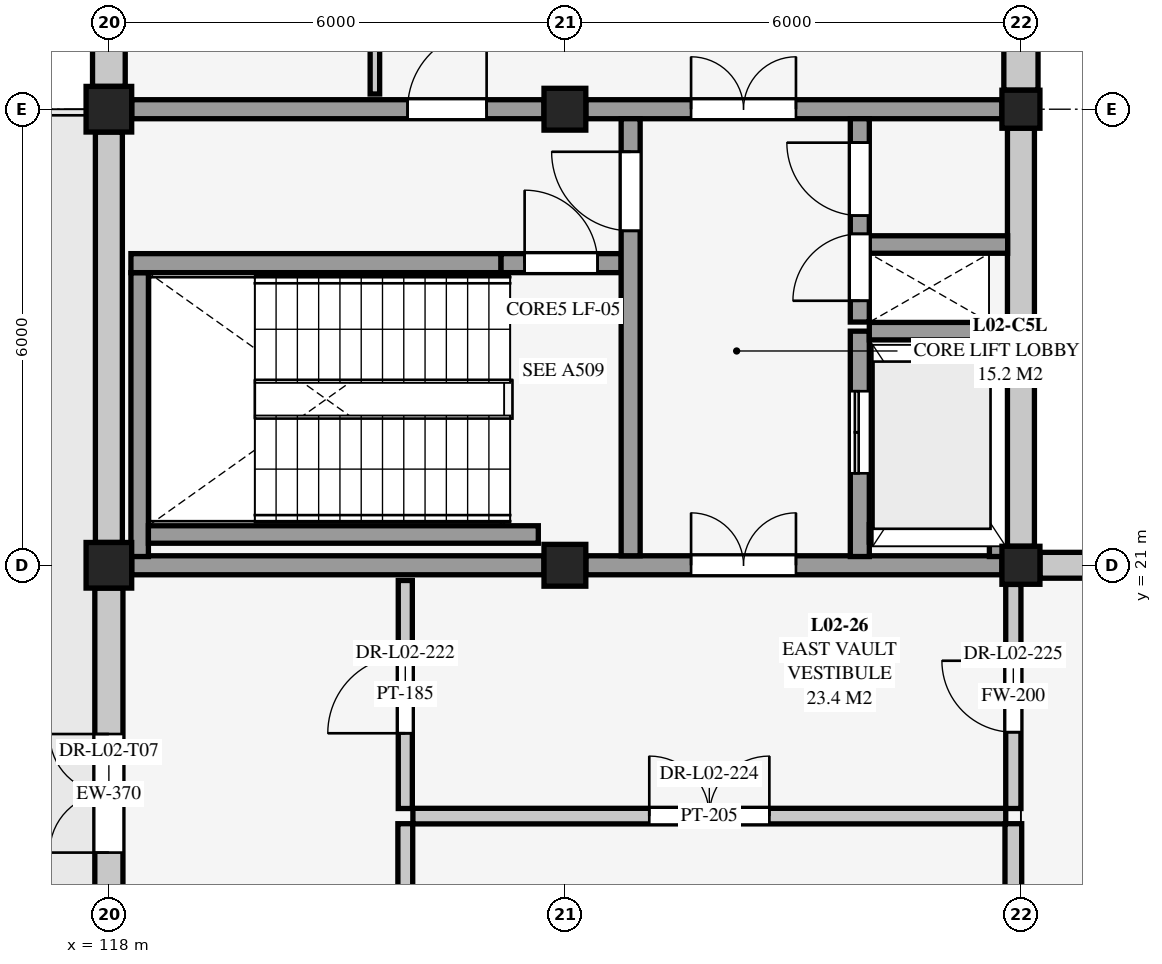
"""IFC4 building model, lengths in metres.
Left out: names, types, materials, properties, quantities, classifications, styles, units other than length and angle.
Written with IfcOpenShell. Run it as: python <this file> out.ifc"""

import sys

from ifc_helpers import new_model, si_unit, direction, frame, frame_2d, origin, origin_2d, place, context, subcontext, project, spatial, rectangle, extrude, element, fill, save


model = new_model("IFC4")
c1 = context("Model", 3, precision=1e-05, world=origin(), true_north=direction((0.0, 1.0)))
c2 = subcontext(c1, "Body", "Model", "MODEL_VIEW")
j1 = project(units=[si_unit("LENGTHUNIT", "METRE"), si_unit("PLANEANGLEUNIT", "RADIAN")], contexts=[c1])
p1 = place(None, origin())
s1 = spatial("IfcSite", under=j1, at=p1, CompositionType="ELEMENT")
p2 = place(p1, origin())
s2 = spatial("IfcBuilding", under=s1, at=p2, CompositionType="ELEMENT")
p3 = place(p2, frame((0.0, 0.0, 4.5)))
s3 = spatial("IfcBuildingStorey", under=s2, at=p3, CompositionType="ELEMENT", Elevation=4.5)
for number, where, z_axis, x_axis in (
    (1, (118.0, 21.0, 0.0), (0.0, 0.0, 1.0), (1.0, 0.0, 0.0)),
    (2, (118.0, 27.0, 0.0), (0.0, 0.0, 1.0), (1.0, 0.0, 0.0)),
):
    element("IfcColumn", number, at=place(p3, frame(where, z_axis=z_axis, x_axis=x_axis)), inside=s3, PredefinedType="COLUMN", context=c2, shape_type="SweptSolid", body=[
        extrude(rectangle(XDim=0.6, YDim=0.6, at=origin_2d()), origin(), (0.0, 0.0, 1.0), 4.5),
    ])
for number, where, z_axis, x_axis in (
    (3, (124.0, 21.0, 0.0), (0.0, 0.0, 1.0), (1.0, 0.0, 0.0)),
    (4, (124.0, 27.0, 0.0), (0.0, 0.0, 1.0), (1.0, 0.0, 0.0)),
):
    element("IfcColumn", number, at=place(p3, frame(where, z_axis=z_axis, x_axis=x_axis)), inside=s3, PredefinedType="COLUMN", context=c2, shape_type="SweptSolid", body=[
        extrude(rectangle(XDim=0.55, YDim=0.55, at=origin_2d()), origin(), (0.0, 0.0, 1.0), 4.5),
    ])
for number, where, z_axis, x_axis in (
    (5, (130.0, 21.0, 0.0), (0.0, 0.0, 1.0), (1.0, 0.0, 0.0)),
    (6, (130.0, 27.0, 0.0), (0.0, 0.0, 1.0), (1.0, 0.0, 0.0)),
):
    element("IfcColumn", number, at=place(p3, frame(where, z_axis=z_axis, x_axis=x_axis)), inside=s3, PredefinedType="COLUMN", context=c2, shape_type="SweptSolid", body=[
        extrude(rectangle(XDim=0.5, YDim=0.5, at=origin_2d()), origin(), (0.0, 0.0, 1.0), 4.5),
    ])
p4 = place(p3, frame((130.25, 21.0, 0.0), z_axis=(0.0, 0.0, 1.0), x_axis=(1.0, 0.0, 0.0)))
e7 = element("IfcWall", 7, at=p4, inside=s3, PredefinedType="SOLIDWALL", context=c2, shape_type="SweptSolid", body=[
    extrude(rectangle(XDim=5.425, YDim=0.34, at=frame_2d((2.712, 0.0))), origin(), (0.0, 0.0, 1.0), 3.797),
])
p5 = place(p4, frame((2.137, 0.0, 0.85)))
e8 = element("IfcOpeningElement", 8, at=p5, cuts=e7, PredefinedType="OPENING", context=c2, shape_type="SweptSolid", body=[
    extrude(rectangle(XDim=1.15, YDim=2.05, at=frame_2d((0.575, 1.025))), frame((0.0, 0.18, 0.0), z_axis=(0.0, -1.0, 0.0), x_axis=(1.0, 0.0, 0.0)), (0.0, 0.0, 1.0), 0.36),
])
p6 = place(p3, frame((118.0, 15.275, 0.0), z_axis=(0.0, 0.0, 1.0), x_axis=(0.0, 1.0, 0.0)))
e9 = element("IfcWall", 9, at=p6, inside=s3, PredefinedType="SOLIDWALL", context=c2, shape_type="SweptSolid", body=[
    extrude(rectangle(XDim=5.425, YDim=0.37, at=frame_2d((2.712, 0.0))), origin(), (0.0, 0.0, 1.0), 3.797),
])
p7 = place(p6, frame((1.945, 0.0, 0.0)))
e10 = element("IfcOpeningElement", 10, at=p7, cuts=e9, PredefinedType="OPENING", context=c2, shape_type="SweptSolid", body=[
    extrude(rectangle(XDim=1.56, YDim=2.18, at=frame_2d((0.78, 1.09))), frame((0.0, 0.195, 0.0), z_axis=(0.0, -1.0, 0.0), x_axis=(1.0, 0.0, 0.0)), (0.0, 0.0, 1.0), 0.39),
])
p8 = place(p3, frame((118.0, 21.3, 0.0), z_axis=(0.0, 0.0, 1.0), x_axis=(0.0, 1.0, 0.0)))
e11 = element("IfcWall", 11, at=p8, inside=s3, PredefinedType="SOLIDWALL", context=c2, shape_type="SweptSolid", body=[
    extrude(rectangle(XDim=5.4, YDim=0.355, at=frame_2d((2.7, 0.0))), origin(), (0.0, 0.0, 1.0), 3.797),
])
p9 = place(p3, frame((130.0, 26.75, 0.0), z_axis=(0.0, 0.0, 1.0), x_axis=(0.0, -1.0, 0.0)))
e12 = element("IfcWall", 12, at=p9, inside=s3, PredefinedType="SOLIDWALL", context=c2, shape_type="SweptSolid", body=[
    extrude(rectangle(XDim=5.5, YDim=0.355, at=frame_2d((2.75, 0.0))), origin(), (0.0, 0.0, 1.0), 3.797),
])
p10 = place(p3, frame((118.0, 27.3, 0.0), z_axis=(0.0, 0.0, 1.0), x_axis=(0.0, 1.0, 0.0)))
e13 = element("IfcWall", 13, at=p10, inside=s3, PredefinedType="SOLIDWALL", context=c2, shape_type="SweptSolid", body=[
    extrude(rectangle(XDim=5.4, YDim=0.43, at=frame_2d((2.7, 0.0))), origin(), (0.0, 0.0, 1.0), 3.778),
])
p11 = place(p10, frame((1.975, 0.0, 0.75)))
e14 = element("IfcOpeningElement", 14, at=p11, cuts=e13, PredefinedType="OPENING", context=c2, shape_type="SweptSolid", body=[
    extrude(rectangle(XDim=1.45, YDim=2.25, at=frame_2d((0.725, 1.125))), frame((0.0, 0.225, 0.0), z_axis=(0.0, -1.0, 0.0), x_axis=(1.0, 0.0, 0.0)), (0.0, 0.0, 1.0), 0.45),
])
p12 = place(p3, frame((130.0, 32.75, 0.0), z_axis=(0.0, 0.0, 1.0), x_axis=(0.0, -1.0, 0.0)))
e15 = element("IfcWall", 15, at=p12, inside=s3, PredefinedType="SOLIDWALL", context=c2, shape_type="SweptSolid", body=[
    extrude(rectangle(XDim=5.5, YDim=0.45, at=frame_2d((2.75, 0.0))), origin(), (0.0, 0.0, 1.0), 3.778),
])
p13 = place(p12, frame((1.975, 0.0, 0.75)))
e16 = element("IfcOpeningElement", 16, at=p13, cuts=e15, PredefinedType="OPENING", context=c2, shape_type="SweptSolid", body=[
    extrude(rectangle(XDim=1.55, YDim=2.25, at=frame_2d((0.775, 1.125))), frame((0.0, 0.235, 0.0), z_axis=(0.0, -1.0, 0.0), x_axis=(1.0, 0.0, 0.0)), (0.0, 0.0, 1.0), 0.47),
])
p14 = place(p3, frame((118.3, 21.0, 0.0), z_axis=(0.0, 0.0, 1.0), x_axis=(1.0, 0.0, 0.0)))
e17 = element("IfcWall", 17, at=p14, inside=s3, PredefinedType="SHEAR", context=c2, shape_type="SweptSolid", body=[
    extrude(rectangle(XDim=5.425, YDim=0.25, at=frame_2d((2.712, 0.0))), origin(), (0.0, 0.0, 1.0), 4.204),
])
p15 = place(p3, frame((124.275, 21.0, 0.0), z_axis=(0.0, 0.0, 1.0), x_axis=(1.0, 0.0, 0.0)))
e18 = element("IfcWall", 18, at=p15, inside=s3, PredefinedType="SHEAR", context=c2, shape_type="SweptSolid", body=[
    extrude(rectangle(XDim=5.475, YDim=0.25, at=frame_2d((2.738, 0.0))), origin(), (0.0, 0.0, 1.0), 4.204),
])
p16 = place(p15, frame((1.385, 0.0, 0.0)))
e19 = element("IfcOpeningElement", 19, at=p16, cuts=e18, PredefinedType="OPENING", context=c2, shape_type="SweptSolid", body=[
    extrude(rectangle(XDim=1.38, YDim=2.16, at=frame_2d((0.69, 1.08))), frame((0.0, 0.135, 0.0), z_axis=(0.0, -1.0, 0.0), x_axis=(1.0, 0.0, 0.0)), (0.0, 0.0, 1.0), 0.27),
])
p17 = place(p3, frame((118.3, 27.0, 0.0), z_axis=(0.0, 0.0, 1.0), x_axis=(1.0, 0.0, 0.0)))
e20 = element("IfcWall", 20, at=p17, inside=s3, PredefinedType="SHEAR", context=c2, shape_type="SweptSolid", body=[
    extrude(rectangle(XDim=5.425, YDim=0.25, at=frame_2d((2.712, 0.0))), origin(), (0.0, 0.0, 1.0), 4.204),
])
p18 = place(p17, frame((3.63, 0.0, 0.0)))
e21 = element("IfcOpeningElement", 21, at=p18, cuts=e20, PredefinedType="OPENING", context=c2, shape_type="SweptSolid", body=[
    extrude(rectangle(XDim=1.04, YDim=2.14, at=frame_2d((0.52, 1.07))), frame((0.0, 0.135, 0.0), z_axis=(0.0, -1.0, 0.0), x_axis=(1.0, 0.0, 0.0)), (0.0, 0.0, 1.0), 0.27),
])
p19 = place(p3, frame((124.275, 27.0, 0.0), z_axis=(0.0, 0.0, 1.0), x_axis=(1.0, 0.0, 0.0)))
e22 = element("IfcWall", 22, at=p19, inside=s3, PredefinedType="SHEAR", context=c2, shape_type="SweptSolid", body=[
    extrude(rectangle(XDim=5.475, YDim=0.25, at=frame_2d((2.738, 0.0))), origin(), (0.0, 0.0, 1.0), 4.204),
])
p20 = place(p19, frame((1.385, 0.0, 0.0)))
e23 = element("IfcOpeningElement", 23, at=p20, cuts=e22, PredefinedType="OPENING", context=c2, shape_type="SweptSolid", body=[
    extrude(rectangle(XDim=1.38, YDim=2.16, at=frame_2d((0.69, 1.08))), frame((0.0, 0.135, 0.0), z_axis=(0.0, -1.0, 0.0), x_axis=(1.0, 0.0, 0.0)), (0.0, 0.0, 1.0), 0.27),
])
p21 = place(p3, frame((118.405, 21.115, 0.0), z_axis=(0.0, 0.0, 1.0), x_axis=(0.0, 1.0, 0.0)))
e24 = element("IfcWall", 24, at=p21, inside=s3, PredefinedType="SHEAR", context=c2, shape_type="SweptSolid", body=[
    extrude(rectangle(XDim=3.735, YDim=0.23, at=frame_2d((1.868, 0.0))), origin(), (0.0, 0.0, 1.0), 4.5),
])
p22 = place(p3, frame((118.52, 21.405, 0.0), z_axis=(0.0, 0.0, 1.0), x_axis=(1.0, 0.0, 0.0)))
e25 = element("IfcWall", 25, at=p22, inside=s3, PredefinedType="SHEAR", context=c2, shape_type="SweptSolid", body=[
    extrude(rectangle(XDim=5.13, YDim=0.23, at=frame_2d((2.565, 0.0))), origin(), (0.0, 0.0, 1.0), 4.5),
])
p23 = place(p3, frame((118.29, 24.975, 0.0), z_axis=(0.0, 0.0, 1.0), x_axis=(1.0, 0.0, 0.0)))
e26 = element("IfcWall", 26, at=p23, inside=s3, PredefinedType="SHEAR", context=c2, shape_type="SweptSolid", body=[
    extrude(rectangle(XDim=4.87, YDim=0.25, at=frame_2d((2.435, 0.0))), origin(), (0.0, 0.0, 1.0), 4.5),
])
p24 = place(p3, frame((123.16, 24.975, 0.0), z_axis=(0.0, 0.0, 1.0), x_axis=(1.0, 0.0, 0.0)))
e27 = element("IfcWall", 27, at=p24, inside=s3, PredefinedType="SHEAR", context=c2, shape_type="SweptSolid", body=[
    extrude(rectangle(XDim=1.58, YDim=0.25, at=frame_2d((0.79, 0.0))), origin(), (0.0, 0.0, 1.0), 4.204),
])
p25 = place(p24, frame((0.31, 0.0, 0.0)))
e28 = element("IfcOpeningElement", 28, at=p25, cuts=e27, PredefinedType="OPENING", context=c2, shape_type="SweptSolid", body=[
    extrude(rectangle(XDim=0.96, YDim=2.12, at=frame_2d((0.48, 1.06))), frame((0.0, 0.135, 0.0), z_axis=(0.0, -1.0, 0.0), x_axis=(1.0, 0.0, 0.0)), (0.0, 0.0, 1.0), 0.27),
])
p26 = place(p3, frame((124.865, 21.125, 0.0), z_axis=(0.0, 0.0, 1.0), x_axis=(0.0, 1.0, 0.0)))
e29 = element("IfcWall", 29, at=p26, inside=s3, PredefinedType="SHEAR", context=c2, shape_type="SweptSolid", body=[
    extrude(rectangle(XDim=5.75, YDim=0.25, at=frame_2d((2.875, 0.0))), origin(), (0.0, 0.0, 1.0), 4.204),
])
p27 = place(p26, frame((4.275, 0.0, 0.0)))
e30 = element("IfcOpeningElement", 30, at=p27, cuts=e29, PredefinedType="OPENING", context=c2, shape_type="SweptSolid", body=[
    extrude(rectangle(XDim=1.04, YDim=2.14, at=frame_2d((0.52, 1.07))), frame((0.0, 0.135, 0.0), z_axis=(0.0, -1.0, 0.0), x_axis=(1.0, 0.0, 0.0)), (0.0, 0.0, 1.0), 0.27),
])
p28 = place(p3, frame((127.88, 21.115, 0.0), z_axis=(0.0, 0.0, 1.0), x_axis=(0.0, 1.0, 0.0)))
e31 = element("IfcWall", 31, at=p28, inside=s3, PredefinedType="SHEAR", context=c2, shape_type="SweptSolid", body=[
    extrude(rectangle(XDim=2.965, YDim=0.25, at=frame_2d((1.482, 0.0))), origin(), (0.0, 0.0, 1.0), 4.5),
])
p29 = place(p28, frame((1.095, 0.0, 0.0)))
e32 = element("IfcOpeningElement", 32, at=p29, cuts=e31, PredefinedType="OPENING", context=c2, shape_type="SweptSolid", body=[
    extrude(rectangle(XDim=1.08, YDim=2.15, at=frame_2d((0.54, 1.075))), frame((0.0, 0.135, 0.0), z_axis=(0.0, -1.0, 0.0), x_axis=(1.0, 0.0, 0.0)), (0.0, 0.0, 1.0), 0.27),
])
p30 = place(p3, frame((128.005, 21.42, 0.0), z_axis=(0.0, 0.0, 1.0), x_axis=(1.0, 0.0, 0.0)))
e33 = element("IfcWall", 33, at=p30, inside=s3, PredefinedType="SHEAR", context=c2, shape_type="SweptSolid", body=[
    extrude(rectangle(XDim=1.58, YDim=0.23, at=frame_2d((0.79, 0.0))), origin(), (0.0, 0.0, 1.0), 4.5),
])
p31 = place(p3, frame((129.7, 21.115, 0.0), z_axis=(0.0, 0.0, 1.0), x_axis=(0.0, 1.0, 0.0)))
e34 = element("IfcWall", 34, at=p31, inside=s3, PredefinedType="SHEAR", context=c2, shape_type="SweptSolid", body=[
    extrude(rectangle(XDim=2.965, YDim=0.23, at=frame_2d((1.482, 0.0))), origin(), (0.0, 0.0, 1.0), 4.5),
])
p32 = place(p3, frame((128.005, 24.08, 0.0), z_axis=(0.0, 0.0, 1.0), x_axis=(1.0, 0.0, 0.0)))
e35 = element("IfcWall", 35, at=p32, inside=s3, PredefinedType="SHEAR", context=c2, shape_type="SweptSolid", body=[
    extrude(rectangle(XDim=1.58, YDim=0.23, at=frame_2d((0.79, 0.0))), origin(), (0.0, 0.0, 1.0), 4.5),
])
p33 = place(p3, frame((127.88, 24.2, 0.0), z_axis=(0.0, 0.0, 1.0), x_axis=(0.0, 1.0, 0.0)))
e36 = element("IfcWall", 36, at=p33, inside=s3, PredefinedType="SHEAR", context=c2, shape_type="SweptSolid", body=[
    extrude(rectangle(XDim=2.675, YDim=0.25, at=frame_2d((1.337, 0.0))), origin(), (0.0, 0.0, 1.0), 4.204),
])
p34 = place(p33, frame((0.28, 0.0, 0.0)))
e37 = element("IfcOpeningElement", 37, at=p34, cuts=e36, PredefinedType="OPENING", context=c2, shape_type="SweptSolid", body=[
    extrude(rectangle(XDim=0.88, YDim=2.08, at=frame_2d((0.44, 1.04))), frame((0.0, 0.135, 0.0), z_axis=(0.0, -1.0, 0.0), x_axis=(1.0, 0.0, 0.0)), (0.0, 0.0, 1.0), 0.27),
])
p35 = place(p33, frame((1.4, 0.0, 0.0)))
e38 = element("IfcOpeningElement", 38, at=p35, cuts=e36, PredefinedType="OPENING", context=c2, shape_type="SweptSolid", body=[
    extrude(rectangle(XDim=0.96, YDim=2.12, at=frame_2d((0.48, 1.06))), frame((0.0, 0.135, 0.0), z_axis=(0.0, -1.0, 0.0), x_axis=(1.0, 0.0, 0.0)), (0.0, 0.0, 1.0), 0.27),
])
p36 = place(p3, frame((128.005, 25.22, 0.0), z_axis=(0.0, 0.0, 1.0), x_axis=(1.0, 0.0, 0.0)))
e39 = element("IfcWall", 39, at=p36, inside=s3, PredefinedType="SHEAR", context=c2, shape_type="SweptSolid", body=[
    extrude(rectangle(XDim=1.82, YDim=0.23, at=frame_2d((0.91, 0.0))), origin(), (0.0, 0.0, 1.0), 4.204),
])
p37 = place(p3, frame((121.9, 17.8, 0.0), z_axis=(0.0, 0.0, 1.0), x_axis=(0.0, 1.0, 0.0)))
e40 = element("IfcWall", 40, at=p37, inside=s3, PredefinedType="PARTITIONING", context=c2, shape_type="SweptSolid", body=[
    extrude(rectangle(XDim=3.0, YDim=0.185, at=frame_2d((1.5, 0.0))), origin(), (0.0, 0.0, 1.0), 4.216),
])
p38 = place(p37, frame((0.99, 0.0, 0.0)))
e41 = element("IfcOpeningElement", 41, at=p38, cuts=e40, PredefinedType="OPENING", context=c2, shape_type="SweptSolid", body=[
    extrude(rectangle(XDim=1.02, YDim=2.16, at=frame_2d((0.51, 1.08))), frame((0.0, 0.103, 0.0), z_axis=(0.0, -1.0, 0.0), x_axis=(1.0, 0.0, 0.0)), (0.0, 0.0, 1.0), 0.205),
])
p39 = place(p3, frame((121.9, 9.649, 0.0), z_axis=(0.0, 0.0, 1.0), x_axis=(0.0, 1.0, 0.0)))
e42 = element("IfcWall", 42, at=p39, inside=s3, PredefinedType="PARTITIONING", context=c2, shape_type="SweptSolid", body=[
    extrude(rectangle(XDim=7.951, YDim=0.195, at=frame_2d((3.975, 0.0))), origin(), (0.0, 0.0, 1.0), 4.216),
])
p40 = place(p39, frame((3.185, 0.0, 0.0)))
e43 = element("IfcOpeningElement", 43, at=p40, cuts=e42, PredefinedType="OPENING", context=c2, shape_type="SweptSolid", body=[
    extrude(rectangle(XDim=1.58, YDim=2.2, at=frame_2d((0.79, 1.1))), frame((0.0, 0.108, 0.0), z_axis=(0.0, -1.0, 0.0), x_axis=(1.0, 0.0, 0.0)), (0.0, 0.0, 1.0), 0.215),
])
p41 = place(p3, frame((122.0, 17.7, 0.0), z_axis=(0.0, 0.0, 1.0), x_axis=(1.0, 0.0, 0.0)))
e44 = element("IfcWall", 44, at=p41, inside=s3, PredefinedType="PARTITIONING", context=c2, shape_type="SweptSolid", body=[
    extrude(rectangle(XDim=7.8, YDim=0.205, at=frame_2d((3.9, 0.0))), origin(), (0.0, 0.0, 1.0), 4.216),
])
p42 = place(p41, frame((3.11, 0.0, 0.0)))
e45 = element("IfcOpeningElement", 45, at=p42, cuts=e44, PredefinedType="OPENING", context=c2, shape_type="SweptSolid", body=[
    extrude(rectangle(XDim=1.58, YDim=2.2, at=frame_2d((0.79, 1.1))), frame((0.0, 0.113, 0.0), z_axis=(0.0, -1.0, 0.0), x_axis=(1.0, 0.0, 0.0)), (0.0, 0.0, 1.0), 0.225),
])
p43 = place(p3, frame((129.9, 17.8, 0.0), z_axis=(0.0, 0.0, 1.0), x_axis=(0.0, 1.0, 0.0)))
e46 = element("IfcWall", 46, at=p43, inside=s3, PredefinedType="SOLIDWALL", context=c2, shape_type="SweptSolid", body=[
    extrude(rectangle(XDim=2.948, YDim=0.2, at=frame_2d((1.474, 0.0))), origin(), (0.0, 0.0, 1.0), 3.85),
])
p44 = place(p43, frame((1.004, 0.0, 0.0)))
e47 = element("IfcOpeningElement", 47, at=p44, cuts=e46, PredefinedType="OPENING", context=c2, shape_type="SweptSolid", body=[
    extrude(rectangle(XDim=0.94, YDim=2.1, at=frame_2d((0.47, 1.05))), frame((0.0, 0.11, 0.0), z_axis=(0.0, -1.0, 0.0), x_axis=(1.0, 0.0, 0.0)), (0.0, 0.0, 1.0), 0.22),
])
p45 = place(p3, frame((129.9, 15.327, 0.0), z_axis=(0.0, 0.0, 1.0), x_axis=(0.0, 1.0, 0.0)))
e48 = element("IfcWall", 48, at=p45, inside=s3, PredefinedType="SOLIDWALL", context=c2, shape_type="SweptSolid", body=[
    extrude(rectangle(XDim=2.273, YDim=0.22, at=frame_2d((1.137, 0.0))), origin(), (0.0, 0.0, 1.0), 3.85),
])
p46 = place(p3, frame((121.5, 27.2, 0.0), z_axis=(0.0, 0.0, 1.0), x_axis=(0.0, 1.0, 0.0)))
e49 = element("IfcWall", 49, at=p46, inside=s3, PredefinedType="PARTITIONING", context=c2, shape_type="SweptSolid", body=[
    extrude(rectangle(XDim=5.6, YDim=0.125, at=frame_2d((2.8, 0.0))), origin(), (0.0, 0.0, 1.0), 4.204),
])
p47 = place(p46, frame((2.03, 0.0, 0.0)))
e50 = element("IfcOpeningElement", 50, at=p47, cuts=e49, PredefinedType="OPENING", context=c2, shape_type="SweptSolid", body=[
    extrude(rectangle(XDim=1.54, YDim=2.26, at=frame_2d((0.77, 1.13))), frame((0.0, 0.073, 0.0), z_axis=(0.0, -1.0, 0.0), x_axis=(1.0, 0.0, 0.0)), (0.0, 0.0, 1.0), 0.145),
])
p48 = place(p7, origin())
e51 = element("IfcDoor", 51, at=p48, inside=s3, OperationType="DOUBLE_DOOR_SINGLE_SWING", PredefinedType="DOOR", context=c2, shape_type="SweptSolid", body=[
    extrude(rectangle(XDim=1.56, YDim=2.18, at=frame_2d((0.78, 1.09))), frame((0.0, 0.025, 0.0), z_axis=(0.0, -1.0, 0.0), x_axis=(1.0, 0.0, 0.0)), (0.0, 0.0, 1.0), 0.05),
])
fill(e10, e51)
p49 = place(p16, origin())
e52 = element("IfcDoor", 52, at=p49, inside=s3, OperationType="DOUBLE_DOOR_SINGLE_SWING", PredefinedType="DOOR", context=c2, shape_type="SweptSolid", body=[
    extrude(rectangle(XDim=1.38, YDim=2.16, at=frame_2d((0.69, 1.08))), frame((0.0, 0.025, 0.0), z_axis=(0.0, -1.0, 0.0), x_axis=(1.0, 0.0, 0.0)), (0.0, 0.0, 1.0), 0.05),
])
fill(e19, e52)
p50 = place(p18, origin())
e53 = element("IfcDoor", 53, at=p50, inside=s3, OperationType="SINGLE_SWING_RIGHT", PredefinedType="DOOR", context=c2, shape_type="SweptSolid", body=[
    extrude(rectangle(XDim=1.04, YDim=2.14, at=frame_2d((0.52, 1.07))), frame((0.0, 0.025, 0.0), z_axis=(0.0, -1.0, 0.0), x_axis=(1.0, 0.0, 0.0)), (0.0, 0.0, 1.0), 0.05),
])
fill(e21, e53)
p51 = place(p20, origin())
e54 = element("IfcDoor", 54, at=p51, inside=s3, OperationType="DOUBLE_DOOR_SINGLE_SWING", PredefinedType="DOOR", context=c2, shape_type="SweptSolid", body=[
    extrude(rectangle(XDim=1.38, YDim=2.16, at=frame_2d((0.69, 1.08))), frame((0.0, 0.025, 0.0), z_axis=(0.0, -1.0, 0.0), x_axis=(1.0, 0.0, 0.0)), (0.0, 0.0, 1.0), 0.05),
])
fill(e23, e54)
p52 = place(p25, origin())
e55 = element("IfcDoor", 55, at=p52, inside=s3, OperationType="SINGLE_SWING_LEFT", PredefinedType="DOOR", context=c2, shape_type="SweptSolid", body=[
    extrude(rectangle(XDim=0.96, YDim=2.12, at=frame_2d((0.48, 1.06))), frame((0.0, 0.025, 0.0), z_axis=(0.0, -1.0, 0.0), x_axis=(1.0, 0.0, 0.0)), (0.0, 0.0, 1.0), 0.05),
])
fill(e28, e55)
p53 = place(p27, origin())
e56 = element("IfcDoor", 56, at=p53, inside=s3, OperationType="SINGLE_SWING_RIGHT", PredefinedType="DOOR", context=c2, shape_type="SweptSolid", body=[
    extrude(rectangle(XDim=1.04, YDim=2.14, at=frame_2d((0.52, 1.07))), frame((0.0, 0.025, 0.0), z_axis=(0.0, -1.0, 0.0), x_axis=(1.0, 0.0, 0.0)), (0.0, 0.0, 1.0), 0.05),
])
fill(e30, e56)
p54 = place(p29, origin())
e57 = element("IfcDoor", 57, at=p54, inside=s3, OperationType="DOUBLE_DOOR_SLIDING", PredefinedType="DOOR", context=c2, shape_type="SweptSolid", body=[
    extrude(rectangle(XDim=1.08, YDim=2.15, at=frame_2d((0.54, 1.075))), frame((0.0, 0.025, 0.0), z_axis=(0.0, -1.0, 0.0), x_axis=(1.0, 0.0, 0.0)), (0.0, 0.0, 1.0), 0.05),
])
fill(e32, e57)
p55 = place(p34, origin())
e58 = element("IfcDoor", 58, at=p55, inside=s3, OperationType="SINGLE_SWING_LEFT", PredefinedType="DOOR", context=c2, shape_type="SweptSolid", body=[
    extrude(rectangle(XDim=0.88, YDim=2.08, at=frame_2d((0.44, 1.04))), frame((0.0, 0.025, 0.0), z_axis=(0.0, -1.0, 0.0), x_axis=(1.0, 0.0, 0.0)), (0.0, 0.0, 1.0), 0.05),
])
fill(e37, e58)
p56 = place(p35, origin())
e59 = element("IfcDoor", 59, at=p56, inside=s3, OperationType="SINGLE_SWING_RIGHT", PredefinedType="DOOR", context=c2, shape_type="SweptSolid", body=[
    extrude(rectangle(XDim=0.96, YDim=2.12, at=frame_2d((0.48, 1.06))), frame((0.0, 0.025, 0.0), z_axis=(0.0, -1.0, 0.0), x_axis=(1.0, 0.0, 0.0)), (0.0, 0.0, 1.0), 0.05),
])
fill(e38, e59)
p57 = place(p38, origin())
e60 = element("IfcDoor", 60, at=p57, inside=s3, OperationType="SINGLE_SWING_LEFT", PredefinedType="DOOR", context=c2, shape_type="SweptSolid", body=[
    extrude(rectangle(XDim=1.02, YDim=2.16, at=frame_2d((0.51, 1.08))), frame((0.0, 0.025, 0.0), z_axis=(0.0, -1.0, 0.0), x_axis=(1.0, 0.0, 0.0)), (0.0, 0.0, 1.0), 0.05),
])
fill(e41, e60)
p58 = place(p42, origin())
e61 = element("IfcDoor", 61, at=p58, inside=s3, OperationType="DOUBLE_DOOR_SINGLE_SWING", PredefinedType="DOOR", context=c2, shape_type="SweptSolid", body=[
    extrude(rectangle(XDim=1.58, YDim=2.2, at=frame_2d((0.79, 1.1))), frame((0.0, 0.025, 0.0), z_axis=(0.0, -1.0, 0.0), x_axis=(1.0, 0.0, 0.0)), (0.0, 0.0, 1.0), 0.05),
])
fill(e45, e61)
p59 = place(p44, origin())
e62 = element("IfcDoor", 62, at=p59, inside=s3, OperationType="SINGLE_SWING_RIGHT", PredefinedType="DOOR", context=c2, shape_type="SweptSolid", body=[
    extrude(rectangle(XDim=0.94, YDim=2.1, at=frame_2d((0.47, 1.05))), frame((0.0, 0.025, 0.0), z_axis=(0.0, -1.0, 0.0), x_axis=(1.0, 0.0, 0.0)), (0.0, 0.0, 1.0), 0.05),
])
fill(e47, e62)
save(model, sys.argv[1])
